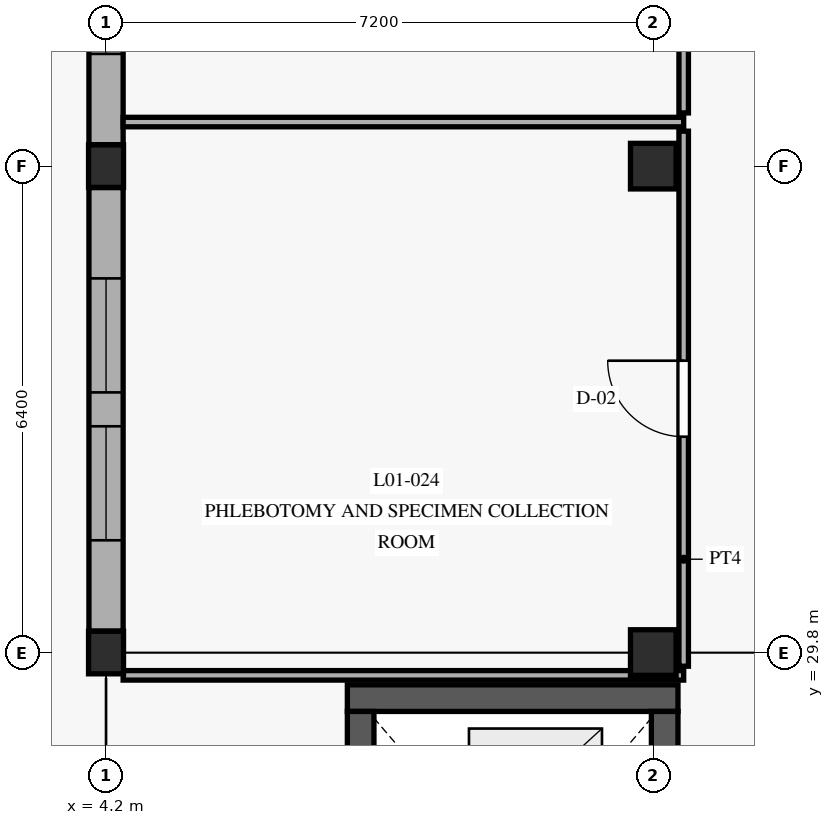
"""IFC4 building model, lengths in metres.
Left out: names, types, materials, properties, quantities, classifications, styles, units other than length and angle.
Written with IfcOpenShell. Run it as: python <this file> out.ifc"""

import sys

from ifc_helpers import new_model, si_unit, direction, frame, frame_2d, origin, origin_with_axes, origin_2d, place, context, subcontext, project, spatial, rectangle, extrude, element, fill, save


model = new_model("IFC4")
c1 = context("Model", 3, precision=1e-05, world=origin(), true_north=direction((0.0, 1.0)))
c2 = subcontext(c1, "Body", "Model", "MODEL_VIEW")
j1 = project(units=[si_unit("LENGTHUNIT", "METRE"), si_unit("PLANEANGLEUNIT", "RADIAN")], contexts=[c1])
p1 = place(None, origin())
s1 = spatial("IfcSite", under=j1, at=p1, CompositionType="ELEMENT")
p2 = place(p1, origin())
s2 = spatial("IfcBuilding", under=s1, at=p2, CompositionType="ELEMENT")
p3 = place(p2, origin())
s3 = spatial("IfcBuildingStorey", under=s2, at=p3, CompositionType="ELEMENT", Elevation=0.0)
for number, where, z_axis, x_axis in (
    (1, (4.2, 29.8, 0.0), (0.0, 0.0, 1.0), (1.0, 0.0, 0.0)),
    (2, (4.2, 36.2, 0.0), (0.0, 0.0, 1.0), (1.0, 0.0, 0.0)),
):
    element("IfcColumn", number, at=place(p3, frame(where, z_axis=z_axis, x_axis=x_axis)), inside=s3, PredefinedType="COLUMN", context=c2, shape_type="SweptSolid", body=[
        extrude(rectangle(XDim=0.46, YDim=0.56, at=origin_2d()), origin(), (0.0, 0.0, 1.0), 4.8),
    ])
for number, where, z_axis, x_axis in (
    (3, (11.4, 29.8, 0.0), (0.0, 0.0, 1.0), (1.0, 0.0, 0.0)),
    (4, (11.4, 36.2, 0.0), (0.0, 0.0, 1.0), (1.0, 0.0, 0.0)),
):
    element("IfcColumn", number, at=place(p3, frame(where, z_axis=z_axis, x_axis=x_axis)), inside=s3, PredefinedType="COLUMN", context=c2, shape_type="SweptSolid", body=[
        extrude(rectangle(XDim=0.6, YDim=0.6, at=origin_2d()), origin(), (0.0, 0.0, 1.0), 4.8),
    ])
p4 = place(p3, frame((11.725, 29.2, 0.0), z_axis=(0.0, 0.0, 1.0), x_axis=(-1.0, 0.0, 0.0)))
e5 = element("IfcWall", 5, at=p4, inside=s3, PredefinedType="SHEAR", context=c2, shape_type="SweptSolid", body=[
    extrude(rectangle(XDim=4.35, YDim=0.35, at=frame_2d((2.175, 0.0))), origin(), (0.0, 0.0, 1.0), 4.42),
])
p5 = place(p3, frame((7.55, 29.025, 0.0), z_axis=(0.0, 0.0, 1.0), x_axis=(0.0, -1.0, 0.0)))
e6 = element("IfcWall", 6, at=p5, inside=s3, PredefinedType="SHEAR", context=c2, shape_type="SweptSolid", body=[
    extrude(rectangle(XDim=11.65, YDim=0.35, at=frame_2d((5.825, 0.0))), origin(), (0.0, 0.0, 1.0), 4.42),
])
p6 = place(p5, frame((10.25, 0.0, 0.0)))
e7 = element("IfcOpeningElement", 7, at=p6, cuts=e6, PredefinedType="OPENING", context=c2, shape_type="SweptSolid", body=[
    extrude(rectangle(XDim=1.1, YDim=2.2, at=frame_2d((0.55, 1.1))), frame((0.0, 0.185, 0.0), z_axis=(0.0, -1.0, 0.0), x_axis=(1.0, 0.0, 0.0)), (0.0, 0.0, 1.0), 0.37),
])
p7 = place(p3, frame((11.55, 17.375, 0.0), z_axis=(0.0, 0.0, 1.0), x_axis=(0.0, 1.0, 0.0)))
e8 = element("IfcWall", 8, at=p7, inside=s3, PredefinedType="SHEAR", context=c2, shape_type="SweptSolid", body=[
    extrude(rectangle(XDim=11.65, YDim=0.35, at=frame_2d((5.825, 0.0))), origin(), (0.0, 0.0, 1.0), 4.42),
])
p8 = place(p7, frame((0.2, 0.0, 0.0)))
e9 = element("IfcOpeningElement", 9, at=p8, cuts=e8, PredefinedType="OPENING", context=c2, shape_type="SweptSolid", body=[
    extrude(rectangle(XDim=1.1, YDim=2.2, at=frame_2d((0.55, 1.1))), frame((0.0, 0.185, 0.0), z_axis=(0.0, -1.0, 0.0), x_axis=(1.0, 0.0, 0.0)), (0.0, 0.0, 1.0), 0.37),
])
p9 = place(p7, frame((7.85, 0.0, 0.0)))
e10 = element("IfcOpeningElement", 10, at=p9, cuts=e8, PredefinedType="OPENING", context=c2, shape_type="SweptSolid", body=[
    extrude(rectangle(XDim=1.15, YDim=2.2, at=frame_2d((0.575, 1.1))), frame((0.0, 0.185, 0.0), z_axis=(0.0, -1.0, 0.0), x_axis=(1.0, 0.0, 0.0)), (0.0, 0.0, 1.0), 0.37),
])
p10 = place(p7, frame((10.115, 0.0, 0.0)))
e11 = element("IfcOpeningElement", 11, at=p10, cuts=e8, PredefinedType="OPENING", context=c2, shape_type="SweptSolid", body=[
    extrude(rectangle(XDim=1.02, YDim=2.15, at=frame_2d((0.51, 1.075))), frame((0.0, 0.185, 0.0), z_axis=(0.0, -1.0, 0.0), x_axis=(1.0, 0.0, 0.0)), (0.0, 0.0, 1.0), 0.37),
])
p11 = place(p3, frame((4.2, 35.918, 0.0), z_axis=(0.0, 0.0, 1.0), x_axis=(0.0, -1.0, 0.0)))
e12 = element("IfcWall", 12, at=p11, inside=s3, PredefinedType="SOLIDWALL", context=c2, shape_type="SweptSolid", body=[
    extrude(rectangle(XDim=5.836, YDim=0.45, at=frame_2d((2.918, 0.0))), origin(), (0.0, 0.0, 1.0), 3.87),
])
p12 = place(p11, frame((1.195, 0.0, 0.65)))
e13 = element("IfcOpeningElement", 13, at=p12, cuts=e12, PredefinedType="OPENING", context=c2, shape_type="SweptSolid", body=[
    extrude(rectangle(XDim=1.5, YDim=2.2, at=frame_2d((0.75, 1.1))), frame((0.0, 0.235, 0.0), z_axis=(0.0, -1.0, 0.0), x_axis=(1.0, 0.0, 0.0)), (0.0, 0.0, 1.0), 0.47),
])
p13 = place(p11, frame((3.141, 0.0, 0.65)))
e14 = element("IfcOpeningElement", 14, at=p13, cuts=e12, PredefinedType="OPENING", context=c2, shape_type="SweptSolid", body=[
    extrude(rectangle(XDim=1.5, YDim=2.2, at=frame_2d((0.75, 1.1))), frame((0.0, 0.235, 0.0), z_axis=(0.0, -1.0, 0.0), x_axis=(1.0, 0.0, 0.0)), (0.0, 0.0, 1.0), 0.47),
])
p14 = place(p3, frame((4.2, 42.318, 0.0), z_axis=(0.0, 0.0, 1.0), x_axis=(0.0, -1.0, 0.0)))
e15 = element("IfcWall", 15, at=p14, inside=s3, PredefinedType="SOLIDWALL", context=c2, shape_type="SweptSolid", body=[
    extrude(rectangle(XDim=5.836, YDim=0.45, at=frame_2d((2.918, 0.0))), origin(), (0.0, 0.0, 1.0), 3.87),
])
p15 = place(p14, frame((1.195, 0.0, 0.65)))
e16 = element("IfcOpeningElement", 16, at=p15, cuts=e15, PredefinedType="OPENING", context=c2, shape_type="SweptSolid", body=[
    extrude(rectangle(XDim=1.5, YDim=2.2, at=frame_2d((0.75, 1.1))), frame((0.0, 0.235, 0.0), z_axis=(0.0, -1.0, 0.0), x_axis=(1.0, 0.0, 0.0)), (0.0, 0.0, 1.0), 0.47),
])
p16 = place(p14, frame((3.141, 0.0, 0.65)))
e17 = element("IfcOpeningElement", 17, at=p16, cuts=e15, PredefinedType="OPENING", context=c2, shape_type="SweptSolid", body=[
    extrude(rectangle(XDim=1.5, YDim=2.2, at=frame_2d((0.75, 1.1))), frame((0.0, 0.235, 0.0), z_axis=(0.0, -1.0, 0.0), x_axis=(1.0, 0.0, 0.0)), (0.0, 0.0, 1.0), 0.47),
])
p17 = place(p3, frame((11.8, 29.62, 0.0), z_axis=(0.0, 0.0, 1.0), x_axis=(0.0, 1.0, 0.0)))
e18 = element("IfcWall", 18, at=p17, inside=s3, PredefinedType="PARTITIONING", context=c2, shape_type="SweptSolid", body=[
    extrude(rectangle(XDim=7.04, YDim=0.125, at=frame_2d((3.52, 0.0))), origin(), (0.0, 0.0, 1.0), 3.895),
])
p18 = place(p17, frame((3.02, 0.0, 0.0)))
e19 = element("IfcOpeningElement", 19, at=p18, cuts=e18, PredefinedType="OPENING", context=c2, shape_type="SweptSolid", body=[
    extrude(rectangle(XDim=1.0, YDim=2.15, at=frame_2d((0.5, 1.075))), frame((0.0, 0.073, 0.0), z_axis=(0.0, -1.0, 0.0), x_axis=(1.0, 0.0, 0.0)), (0.0, 0.0, 1.0), 0.145),
])
for number, where, z_axis, x_axis in (
    (20, (4.425, 36.78, 0.0), (0.0, 0.0, 1.0), (1.0, 0.0, 0.0)),
    (21, (4.425, 29.5, 0.0), (0.0, 0.0, 1.0), (1.0, 0.0, 0.0)),
):
    element("IfcWall", number, at=place(p3, frame(where, z_axis=z_axis, x_axis=x_axis)), inside=s3, PredefinedType="PARTITIONING", context=c2, shape_type="SweptSolid", body=[
        extrude(rectangle(XDim=7.375, YDim=0.125, at=frame_2d((3.688, 0.0))), origin(), (0.0, 0.0, 1.0), 3.865),
    ])
p19 = place(p3, frame((11.8, 36.9, 0.0), z_axis=(0.0, 0.0, 1.0), x_axis=(0.0, 1.0, 0.0)))
e22 = element("IfcWall", 22, at=p19, inside=s3, PredefinedType="PARTITIONING", context=c2, shape_type="SweptSolid", body=[
    extrude(rectangle(XDim=5.56, YDim=0.125, at=frame_2d((2.78, 0.0))), origin(), (0.0, 0.0, 1.0), 3.895),
])
p20 = place(p19, frame((2.396, 0.0, 0.0)))
e23 = element("IfcOpeningElement", 23, at=p20, cuts=e22, PredefinedType="OPENING", context=c2, shape_type="SweptSolid", body=[
    extrude(rectangle(XDim=0.92, YDim=2.15, at=frame_2d((0.46, 1.075))), frame((0.0, 0.073, 0.0), z_axis=(0.0, -1.0, 0.0), x_axis=(1.0, 0.0, 0.0)), (0.0, 0.0, 1.0), 0.145),
])
p21 = place(p12, origin_with_axes())
e24 = element("IfcWindow", 24, at=p21, inside=s3, PartitioningType="SINGLE_PANEL", PredefinedType="WINDOW", context=c2, shape_type="SweptSolid", body=[
    extrude(rectangle(XDim=1.5, YDim=2.2, at=frame_2d((0.75, 1.1))), frame((0.0, 0.03, 0.0), z_axis=(0.0, -1.0, 0.0), x_axis=(1.0, 0.0, 0.0)), (0.0, 0.0, 1.0), 0.06),
])
fill(e13, e24)
p22 = place(p13, origin_with_axes())
e25 = element("IfcWindow", 25, at=p22, inside=s3, PartitioningType="SINGLE_PANEL", PredefinedType="WINDOW", context=c2, shape_type="SweptSolid", body=[
    extrude(rectangle(XDim=1.5, YDim=2.2, at=frame_2d((0.75, 1.1))), frame((0.0, 0.03, 0.0), z_axis=(0.0, -1.0, 0.0), x_axis=(1.0, 0.0, 0.0)), (0.0, 0.0, 1.0), 0.06),
])
fill(e14, e25)
p23 = place(p16, origin_with_axes())
e26 = element("IfcWindow", 26, at=p23, inside=s3, PartitioningType="SINGLE_PANEL", PredefinedType="WINDOW", context=c2, shape_type="SweptSolid", body=[
    extrude(rectangle(XDim=1.5, YDim=2.2, at=frame_2d((0.75, 1.1))), frame((0.0, 0.03, 0.0), z_axis=(0.0, -1.0, 0.0), x_axis=(1.0, 0.0, 0.0)), (0.0, 0.0, 1.0), 0.06),
])
fill(e17, e26)
p24 = place(p18, origin_with_axes())
e27 = element("IfcDoor", 27, at=p24, inside=s3, OperationType="SINGLE_SWING_RIGHT", PredefinedType="DOOR", context=c2, shape_type="SweptSolid", body=[
    extrude(rectangle(XDim=1.0, YDim=2.15, at=frame_2d((0.5, 1.075))), frame((0.0, 0.025, 0.0), z_axis=(0.0, -1.0, 0.0), x_axis=(1.0, 0.0, 0.0)), (0.0, 0.0, 1.0), 0.05),
])
fill(e19, e27)
save(model, sys.argv[1])
